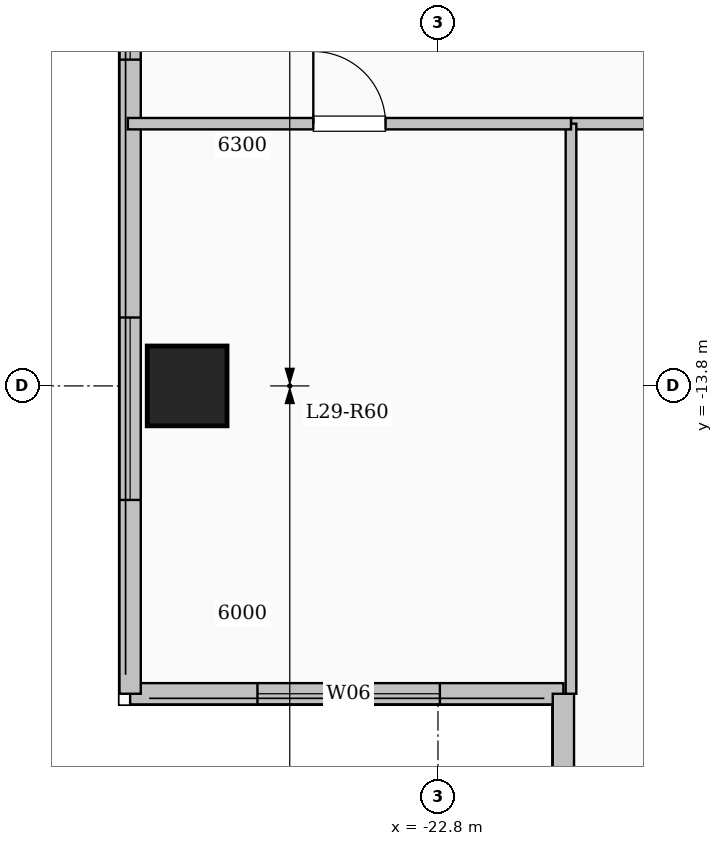
"""IFC4 building model, lengths in metres.
Left out: names, types, materials, properties, quantities, classifications, styles, units other than length and angle.
Written with IfcOpenShell. Run it as: python <this file> out.ifc"""

import sys

from ifc_helpers import new_model, si_unit, direction, frame, frame_2d, origin, origin_2d, place, context, subcontext, project, spatial, rectangle, extrude, element, fill, save


model = new_model("IFC4")
c1 = context("Model", 3, precision=1e-05, world=origin(), true_north=direction((0.0, 1.0)))
c2 = subcontext(c1, "Body", "Model", "MODEL_VIEW")
j1 = project(units=[si_unit("LENGTHUNIT", "METRE"), si_unit("PLANEANGLEUNIT", "RADIAN")], contexts=[c1])
p1 = place(None, origin())
s1 = spatial("IfcSite", under=j1, at=p1, CompositionType="ELEMENT")
p2 = place(p1, origin())
s2 = spatial("IfcBuilding", under=s1, at=p2, CompositionType="ELEMENT")
p3 = place(p2, frame((0.0, 0.0, 108.45)))
s3 = spatial("IfcBuildingStorey", under=s2, at=p3, CompositionType="ELEMENT", Elevation=108.45)
p4 = place(p3, frame((-26.1, -13.8, 0.0), z_axis=(0.0, 0.0, 1.0), x_axis=(1.0, 0.0, 0.0)))
e1 = element("IfcColumn", 1, at=p4, inside=s3, PredefinedType="COLUMN", context=c2, shape_type="SweptSolid", body=[
    extrude(rectangle(XDim=1.05, YDim=1.05, at=origin_2d()), origin(), (0.0, 0.0, 1.0), 3.35),
])
p5 = place(p3, frame((-21.15, -17.85, 0.0), z_axis=(0.0, 0.0, 1.0), x_axis=(-1.0, 0.0, 0.0)))
e2 = element("IfcWall", 2, at=p5, inside=s3, PredefinedType="SOLIDWALL", context=c2, shape_type="SweptSolid", body=[
    extrude(rectangle(XDim=5.7, YDim=0.28, at=frame_2d((2.85, 0.0))), origin(), (0.0, 0.0, 1.0), 3.1),
])
p6 = place(p5, frame((1.625, 0.0, 0.9)))
e3 = element("IfcOpeningElement", 3, at=p6, cuts=e2, PredefinedType="OPENING", context=c2, shape_type="SweptSolid", body=[
    extrude(rectangle(XDim=2.4, YDim=1.8, at=frame_2d((1.2, 0.9))), frame((0.0, 0.15, 0.0), z_axis=(0.0, -1.0, 0.0), x_axis=(1.0, 0.0, 0.0)), (0.0, 0.0, 1.0), 0.3),
])
p7 = place(p3, frame((-26.85, -17.85, 0.0), z_axis=(0.0, 0.0, 1.0), x_axis=(0.0, 1.0, 0.0)))
e4 = element("IfcWall", 4, at=p7, inside=s3, PredefinedType="SOLIDWALL", context=c2, shape_type="SweptSolid", body=[
    extrude(rectangle(XDim=35.7, YDim=0.28, at=frame_2d((17.85, 0.0))), origin(), (0.0, 0.0, 1.0), 3.1),
])
p8 = place(p7, frame((2.55, 0.0, 0.9)))
e5 = element("IfcOpeningElement", 5, at=p8, cuts=e4, PredefinedType="OPENING", context=c2, shape_type="SweptSolid", body=[
    extrude(rectangle(XDim=2.4, YDim=1.8, at=frame_2d((1.2, 0.9))), frame((0.0, 0.15, 0.0), z_axis=(0.0, -1.0, 0.0), x_axis=(1.0, 0.0, 0.0)), (0.0, 0.0, 1.0), 0.3),
])
p9 = place(p7, frame((8.343, 0.0, 0.9)))
e6 = element("IfcOpeningElement", 6, at=p9, cuts=e4, PredefinedType="OPENING", context=c2, shape_type="SweptSolid", body=[
    extrude(rectangle(XDim=1.5, YDim=1.65, at=frame_2d((0.75, 0.825))), frame((0.0, 0.15, 0.0), z_axis=(0.0, -1.0, 0.0), x_axis=(1.0, 0.0, 0.0)), (0.0, 0.0, 1.0), 0.3),
])
p10 = place(p7, frame((13.75, 0.0, 0.9)))
e7 = element("IfcOpeningElement", 7, at=p10, cuts=e4, PredefinedType="OPENING", context=c2, shape_type="SweptSolid", body=[
    extrude(rectangle(XDim=2.4, YDim=1.8, at=frame_2d((1.2, 0.9))), frame((0.0, 0.15, 0.0), z_axis=(0.0, -1.0, 0.0), x_axis=(1.0, 0.0, 0.0)), (0.0, 0.0, 1.0), 0.3),
])
p11 = place(p7, frame((20.175, 0.0, 0.9)))
e8 = element("IfcOpeningElement", 8, at=p11, cuts=e4, PredefinedType="OPENING", context=c2, shape_type="SweptSolid", body=[
    extrude(rectangle(XDim=1.8, YDim=1.65, at=frame_2d((0.9, 0.825))), frame((0.0, 0.15, 0.0), z_axis=(0.0, -1.0, 0.0), x_axis=(1.0, 0.0, 0.0)), (0.0, 0.0, 1.0), 0.3),
])
p12 = place(p7, frame((24.725, 0.0, 0.9)))
e9 = element("IfcOpeningElement", 9, at=p12, cuts=e4, PredefinedType="OPENING", context=c2, shape_type="SweptSolid", body=[
    extrude(rectangle(XDim=2.0, YDim=1.7, at=frame_2d((1.0, 0.85))), frame((0.0, 0.15, 0.0), z_axis=(0.0, -1.0, 0.0), x_axis=(1.0, 0.0, 0.0)), (0.0, 0.0, 1.0), 0.3),
])
p13 = place(p7, frame((28.975, 0.0, 0.95)))
e10 = element("IfcOpeningElement", 10, at=p13, cuts=e4, PredefinedType="OPENING", context=c2, shape_type="SweptSolid", body=[
    extrude(rectangle(XDim=1.0, YDim=1.5, at=frame_2d((0.5, 0.75))), frame((0.0, 0.15, 0.0), z_axis=(0.0, -1.0, 0.0), x_axis=(1.0, 0.0, 0.0)), (0.0, 0.0, 1.0), 0.3),
])
p14 = place(p7, frame((32.025, 0.0, 0.9)))
e11 = element("IfcOpeningElement", 11, at=p14, cuts=e4, PredefinedType="OPENING", context=c2, shape_type="SweptSolid", body=[
    extrude(rectangle(XDim=2.0, YDim=1.7, at=frame_2d((1.0, 0.85))), frame((0.0, 0.15, 0.0), z_axis=(0.0, -1.0, 0.0), x_axis=(1.0, 0.0, 0.0)), (0.0, 0.0, 1.0), 0.3),
])
p15 = place(p3, frame((-21.15, -22.05, 0.0), z_axis=(0.0, 0.0, 1.0), x_axis=(0.0, 1.0, 0.0)))
e12 = element("IfcWall", 12, at=p15, inside=s3, PredefinedType="SOLIDWALL", context=c2, shape_type="SweptSolid", body=[
    extrude(rectangle(XDim=4.2, YDim=0.28, at=frame_2d((2.1, 0.0))), origin(), (0.0, 0.0, 1.0), 3.1),
])
p16 = place(p15, frame((1.118, 0.0, 0.9)))
e13 = element("IfcOpeningElement", 13, at=p16, cuts=e12, PredefinedType="OPENING", context=c2, shape_type="SweptSolid", body=[
    extrude(rectangle(XDim=2.0, YDim=1.7, at=frame_2d((1.0, 0.85))), frame((0.0, 0.15, 0.0), z_axis=(0.0, -1.0, 0.0), x_axis=(1.0, 0.0, 0.0)), (0.0, 0.0, 1.0), 0.3),
])
p17 = place(p3, frame((-21.05, -10.35, 0.0), z_axis=(0.0, 0.0, 1.0), x_axis=(1.0, 0.0, 0.0)))
e14 = element("IfcWall", 14, at=p17, inside=s3, PredefinedType="PARTITIONING", context=c2, shape_type="SweptSolid", body=[
    extrude(rectangle(XDim=12.5, YDim=0.15, at=frame_2d((6.25, 0.0))), origin(), (0.0, 0.0, 1.0), 3.1),
])
p18 = place(p17, frame((1.736, 0.0, 0.0)))
e15 = element("IfcOpeningElement", 15, at=p18, cuts=e14, PredefinedType="OPENING", context=c2, shape_type="SweptSolid", body=[
    extrude(rectangle(XDim=0.95, YDim=2.15, at=frame_2d((0.475, 1.075))), frame((0.0, 0.085, 0.0), z_axis=(0.0, -1.0, 0.0), x_axis=(1.0, 0.0, 0.0)), (0.0, 0.0, 1.0), 0.17),
])
p19 = place(p17, frame((6.248, 0.0, 0.0)))
e16 = element("IfcOpeningElement", 16, at=p19, cuts=e14, PredefinedType="OPENING", context=c2, shape_type="SweptSolid", body=[
    extrude(rectangle(XDim=0.95, YDim=2.15, at=frame_2d((0.475, 1.075))), frame((0.0, 0.085, 0.0), z_axis=(0.0, -1.0, 0.0), x_axis=(1.0, 0.0, 0.0)), (0.0, 0.0, 1.0), 0.17),
])
p20 = place(p17, frame((10.262, 0.0, 0.0)))
e17 = element("IfcOpeningElement", 17, at=p20, cuts=e14, PredefinedType="OPENING", context=c2, shape_type="SweptSolid", body=[
    extrude(rectangle(XDim=0.95, YDim=2.15, at=frame_2d((0.475, 1.075))), frame((0.0, 0.085, 0.0), z_axis=(0.0, -1.0, 0.0), x_axis=(1.0, 0.0, 0.0)), (0.0, 0.0, 1.0), 0.17),
])
p21 = place(p3, frame((-21.05, -17.85, 0.0), z_axis=(0.0, 0.0, 1.0), x_axis=(0.0, 1.0, 0.0)))
e18 = element("IfcWall", 18, at=p21, inside=s3, PredefinedType="PARTITIONING", context=c2, shape_type="SweptSolid", body=[
    extrude(rectangle(XDim=7.5, YDim=0.14, at=frame_2d((3.75, 0.0))), origin(), (0.0, 0.0, 1.0), 3.1),
])
p22 = place(p3, frame((-26.88, -10.35, 0.0), z_axis=(0.0, 0.0, 1.0), x_axis=(1.0, 0.0, 0.0)))
e19 = element("IfcWall", 19, at=p22, inside=s3, PredefinedType="PARTITIONING", context=c2, shape_type="SweptSolid", body=[
    extrude(rectangle(XDim=5.83, YDim=0.15, at=frame_2d((2.915, 0.0))), origin(), (0.0, 0.0, 1.0), 3.1),
])
p23 = place(p22, frame((2.44, 0.0, 0.0)))
e20 = element("IfcOpeningElement", 20, at=p23, cuts=e19, PredefinedType="OPENING", context=c2, shape_type="SweptSolid", body=[
    extrude(rectangle(XDim=0.95, YDim=2.15, at=frame_2d((0.475, 1.075))), frame((0.0, 0.085, 0.0), z_axis=(0.0, -1.0, 0.0), x_axis=(1.0, 0.0, 0.0)), (0.0, 0.0, 1.0), 0.17),
])
p24 = place(p6, origin())
e21 = element("IfcWindow", 21, at=p24, inside=s3, PartitioningType="SINGLE_PANEL", PredefinedType="WINDOW", context=c2, shape_type="SweptSolid", body=[
    extrude(rectangle(XDim=2.4, YDim=1.8, at=frame_2d((1.2, 0.9))), frame((0.0, 0.03, 0.0), z_axis=(0.0, -1.0, 0.0), x_axis=(1.0, 0.0, 0.0)), (0.0, 0.0, 1.0), 0.06),
])
fill(e3, e21)
p25 = place(p8, origin())
e22 = element("IfcWindow", 22, at=p25, inside=s3, PartitioningType="SINGLE_PANEL", PredefinedType="WINDOW", context=c2, shape_type="SweptSolid", body=[
    extrude(rectangle(XDim=2.4, YDim=1.8, at=frame_2d((1.2, 0.9))), frame((0.0, 0.03, 0.0), z_axis=(0.0, -1.0, 0.0), x_axis=(1.0, 0.0, 0.0)), (0.0, 0.0, 1.0), 0.06),
])
fill(e5, e22)
p26 = place(p9, origin())
e23 = element("IfcWindow", 23, at=p26, inside=s3, PartitioningType="SINGLE_PANEL", PredefinedType="WINDOW", context=c2, shape_type="SweptSolid", body=[
    extrude(rectangle(XDim=1.5, YDim=1.65, at=frame_2d((0.75, 0.825))), frame((0.0, 0.03, 0.0), z_axis=(0.0, -1.0, 0.0), x_axis=(1.0, 0.0, 0.0)), (0.0, 0.0, 1.0), 0.06),
])
fill(e6, e23)
p27 = place(p23, origin())
e24 = element("IfcDoor", 24, at=p27, inside=s3, OperationType="SINGLE_SWING_LEFT", PredefinedType="DOOR", context=c2, shape_type="SweptSolid", body=[
    extrude(rectangle(XDim=0.95, YDim=2.15, at=frame_2d((0.475, 1.075))), frame((0.0, 0.025, 0.0), z_axis=(0.0, -1.0, 0.0), x_axis=(1.0, 0.0, 0.0)), (0.0, 0.0, 1.0), 0.05),
])
fill(e20, e24)
save(model, sys.argv[1])
